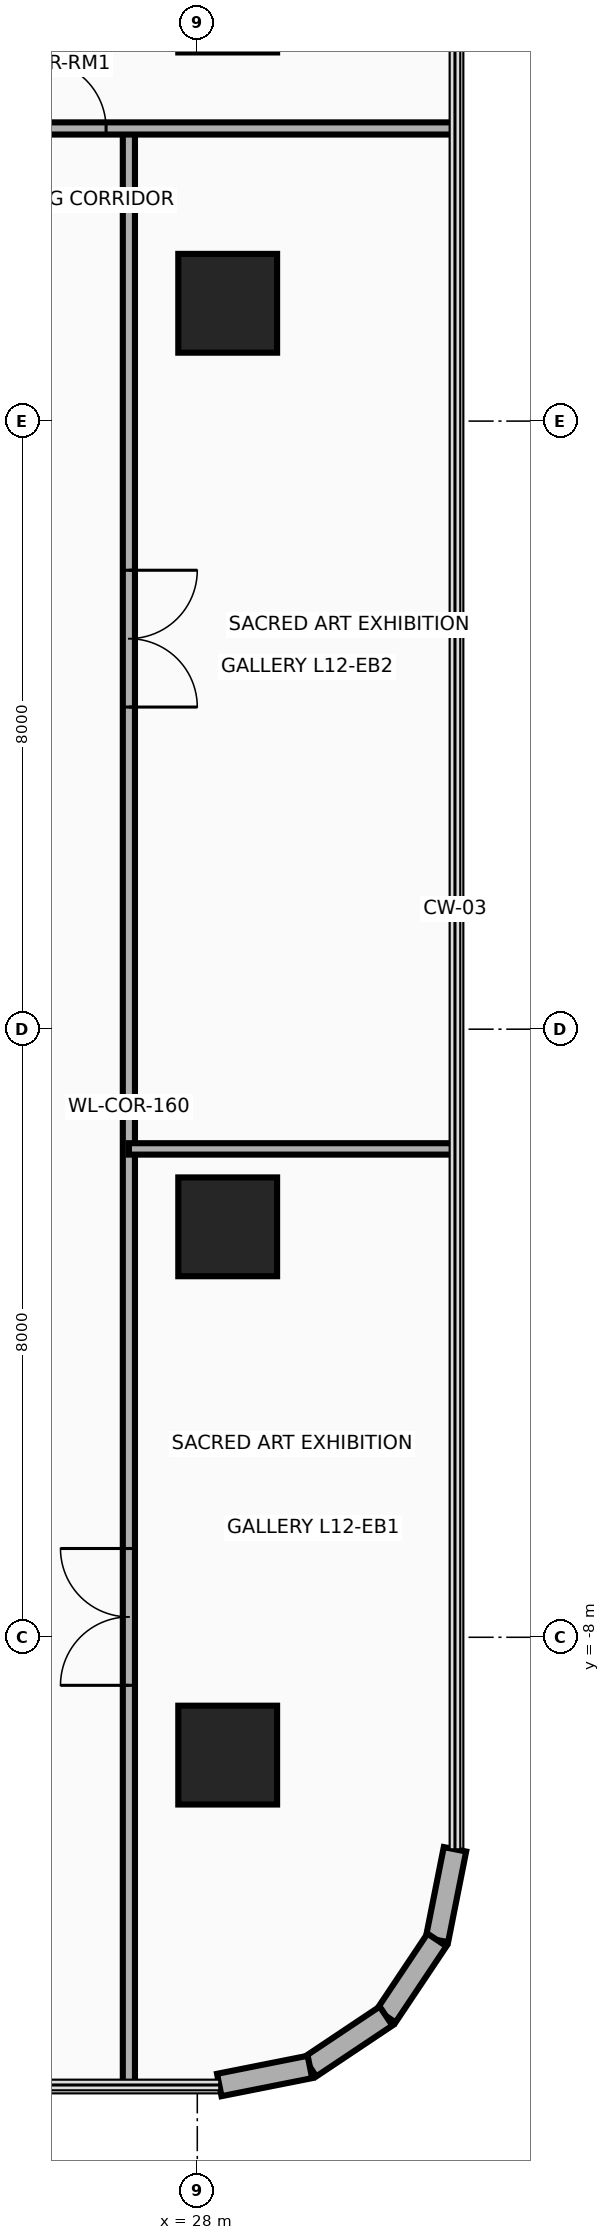
"""IFC4 building model, lengths in metres.
Left out: names, types, materials, properties, quantities, classifications, styles, units other than length and angle.
Written with IfcOpenShell. Run it as: python <this file> out.ifc"""

import sys

from ifc_helpers import new_model, si_unit, direction, frame, frame_2d, origin, origin_2d, place, context, subcontext, project, spatial, rectangle, circle, extrude, source, transform, mapped, element, fill, save


model = new_model("IFC4")
c1 = context("Model", 3, precision=1e-05, world=origin(), true_north=direction((0.0, 1.0)))
c2 = subcontext(c1, "Body", "Model", "MODEL_VIEW")
j1 = project(units=[si_unit("LENGTHUNIT", "METRE"), si_unit("PLANEANGLEUNIT", "RADIAN")], contexts=[c1])
p1 = place(None, origin())
s1 = spatial("IfcSite", under=j1, at=p1, CompositionType="ELEMENT")
p2 = place(p1, origin())
s2 = spatial("IfcBuilding", under=s1, at=p2, CompositionType="ELEMENT")
p3 = place(p2, frame((0.0, 0.0, 51.9)))
s3 = spatial("IfcBuildingStorey", under=s2, at=p3, CompositionType="ELEMENT", Elevation=51.9)
m1 = source(origin(), c2, "Body", "SweptSolid", [
    extrude(circle(Radius=0.65, at=origin_2d()), origin(), (0.0, 0.0, 1.0), 3.7),
])
for number, where, z_axis, x_axis in (
    (1, (28.4, -9.55, 0.0), (0.0, 0.0, 1.0), (1.0, 0.0, 0.0)),
    (2, (28.4, -2.6, 0.0), (0.0, 0.0, 1.0), (1.0, 0.0, 0.0)),
    (3, (28.4, 9.55, 0.0), (0.0, 0.0, 1.0), (1.0, 0.0, 0.0)),
):
    element("IfcColumn", number, at=place(p3, frame(where, z_axis=z_axis, x_axis=x_axis)), inside=s3, PredefinedType="COLUMN", context=c2, shape_type="MappedRepresentation", body=[
        mapped(m1, transform((0.0, 0.0, 0.0), x_axis=(1.0, 0.0, 0.0), y_axis=(0.0, 1.0, 0.0), z_axis=(0.0, 0.0, 1.0), scale=1.0)),
    ])
p4 = place(p3, frame((31.39, -10.789, 0.0), z_axis=(0.0, 0.0, 1.0), x_axis=(-0.194996050505, -0.980804027463, 0.0)))
e4 = element("IfcWall", 4, at=p4, inside=s3, PredefinedType="SOLIDWALL", context=c2, shape_type="SweptSolid", body=[
    extrude(rectangle(XDim=1.216, YDim=0.3, at=frame_2d((0.608, 0.0))), origin(), (0.0, 0.0, 1.0), 3.46),
])
for number, where, z_axis, x_axis in (
    (5, (31.153, -11.982, 0.0), (0.0, 0.0, 1.0), (-0.556, -0.831, 0.0)),
    (6, (30.483, -12.983, 0.0), (0.0, 0.0, 1.0), (-0.831, -0.556, 0.0)),
):
    element("IfcWall", number, at=place(p3, frame(where, z_axis=z_axis, x_axis=x_axis)), inside=s3, PredefinedType="SOLIDWALL", context=c2, shape_type="SweptSolid", body=[
        extrude(rectangle(XDim=1.205, YDim=0.3, at=frame_2d((0.603, 0.0))), origin(), (0.0, 0.0, 1.0), 3.46),
    ])
p5 = place(p3, frame((29.482, -13.653, 0.0), z_axis=(0.0, 0.0, 1.0), x_axis=(-0.980804027463, -0.194996050505, 0.0)))
e7 = element("IfcWall", 7, at=p5, inside=s3, PredefinedType="SOLIDWALL", context=c2, shape_type="SweptSolid", body=[
    extrude(rectangle(XDim=1.216, YDim=0.3, at=frame_2d((0.608, 0.0))), origin(), (0.0, 0.0, 1.0), 3.46),
])
p6 = place(p3, frame((27.1, -13.89, 0.0), z_axis=(0.0, 0.0, 1.0), x_axis=(0.0, 1.0, 0.0)))
e8 = element("IfcWall", 8, at=p6, inside=s3, PredefinedType="PARTITIONING", context=c2, shape_type="SweptSolid", body=[
    extrude(rectangle(XDim=25.74, YDim=0.16, at=frame_2d((12.87, 0.0))), origin(), (0.0, 0.0, 1.0), 2.583),
])
p7 = place(p6, frame((5.258, 0.0, 0.0)))
e9 = element("IfcOpeningElement", 9, at=p7, cuts=e8, PredefinedType="OPENING", context=c2, shape_type="SweptSolid", body=[
    extrude(rectangle(XDim=1.8, YDim=2.15, at=frame_2d((0.9, 1.075))), frame((0.0, 0.095, 0.0), z_axis=(0.0, -1.0, 0.0), x_axis=(1.0, 0.0, 0.0)), (0.0, 0.0, 1.0), 0.19),
])
p8 = place(p6, frame((18.128, 0.0, 0.0)))
e10 = element("IfcOpeningElement", 10, at=p8, cuts=e8, PredefinedType="OPENING", context=c2, shape_type="SweptSolid", body=[
    extrude(rectangle(XDim=1.8, YDim=2.15, at=frame_2d((0.9, 1.075))), frame((0.0, 0.095, 0.0), z_axis=(0.0, -1.0, 0.0), x_axis=(1.0, 0.0, 0.0)), (0.0, 0.0, 1.0), 0.19),
])
p9 = place(p3, frame((25.6, 11.85, 0.0), z_axis=(0.0, 0.0, 1.0), x_axis=(1.0, 0.0, 0.0)))
e11 = element("IfcWall", 11, at=p9, inside=s3, PredefinedType="PARTITIONING", context=c2, shape_type="SweptSolid", body=[
    extrude(rectangle(XDim=5.79, YDim=0.16, at=frame_2d((2.895, 0.0))), origin(), (0.0, 0.0, 1.0), 2.896),
])
p10 = place(p9, frame((0.3, 0.0, 0.0)))
e12 = element("IfcOpeningElement", 12, at=p10, cuts=e11, PredefinedType="OPENING", context=c2, shape_type="SweptSolid", body=[
    extrude(rectangle(XDim=0.9, YDim=2.1, at=frame_2d((0.45, 1.05))), frame((0.0, 0.095, 0.0), z_axis=(0.0, -1.0, 0.0), x_axis=(1.0, 0.0, 0.0)), (0.0, 0.0, 1.0), 0.19),
])
p11 = place(p3, frame((27.1, -1.575, 0.0), z_axis=(0.0, 0.0, 1.0), x_axis=(1.0, 0.0, 0.0)))
e13 = element("IfcWall", 13, at=p11, inside=s3, PredefinedType="PARTITIONING", context=c2, shape_type="SweptSolid", body=[
    extrude(rectangle(XDim=4.29, YDim=0.15, at=frame_2d((2.145, 0.0))), origin(), (0.0, 0.0, 1.0), 2.896),
])
p12 = place(p10, origin())
e14 = element("IfcDoor", 14, at=p12, inside=s3, OperationType="SINGLE_SWING_LEFT", PredefinedType="DOOR", context=c2, shape_type="SweptSolid", body=[
    extrude(rectangle(XDim=0.9, YDim=2.1, at=frame_2d((0.45, 1.05))), frame((0.0, 0.025, 0.0), z_axis=(0.0, -1.0, 0.0), x_axis=(1.0, 0.0, 0.0)), (0.0, 0.0, 1.0), 0.05),
])
fill(e12, e14)
p13 = place(p7, origin())
e15 = element("IfcDoor", 15, at=p13, inside=s3, OperationType="DOUBLE_DOOR_SINGLE_SWING", PredefinedType="DOOR", context=c2, shape_type="SweptSolid", body=[
    extrude(rectangle(XDim=1.8, YDim=2.15, at=frame_2d((0.9, 1.075))), frame((0.0, 0.025, 0.0), z_axis=(0.0, -1.0, 0.0), x_axis=(1.0, 0.0, 0.0)), (0.0, 0.0, 1.0), 0.05),
])
fill(e9, e15)
p14 = place(p8, frame((1.8, 0.0, 0.0), z_axis=(0.0, 0.0, 1.0), x_axis=(-1.0, 0.0, 0.0)))
e16 = element("IfcDoor", 16, at=p14, inside=s3, OperationType="DOUBLE_DOOR_SINGLE_SWING", PredefinedType="DOOR", context=c2, shape_type="SweptSolid", body=[
    extrude(rectangle(XDim=1.8, YDim=2.15, at=frame_2d((0.9, 1.075))), frame((0.0, 0.025, 0.0), z_axis=(0.0, -1.0, 0.0), x_axis=(1.0, 0.0, 0.0)), (0.0, 0.0, 1.0), 0.05),
])
fill(e10, e16)
save(model, sys.argv[1])
